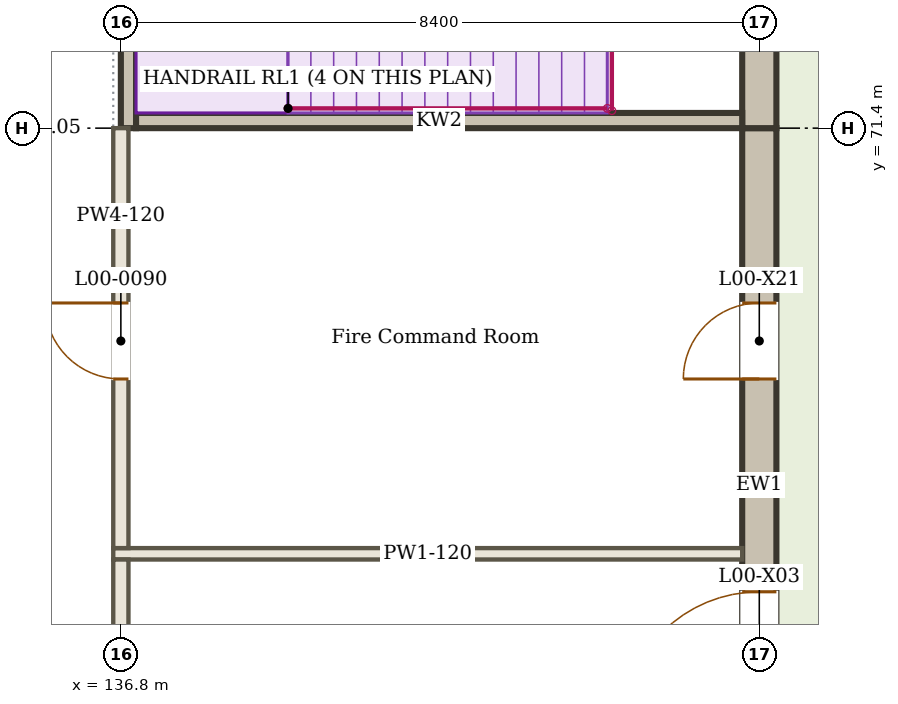
"""IFC4 building model, lengths in metres.
Left out: names, types, materials, properties, quantities, classifications, styles, units other than length and angle.
Written with IfcOpenShell. Run it as: python <this file> out.ifc"""

import sys

from ifc_helpers import new_model, si_unit, direction, frame, frame_2d, origin, place, context, subcontext, project, spatial, rectangle, extrude, element, fill, save


model = new_model("IFC4")
c1 = context("Model", 3, precision=1e-05, world=origin(), true_north=direction((0.0, 1.0)))
c2 = subcontext(c1, "Body", "Model", "MODEL_VIEW")
j1 = project(units=[si_unit("LENGTHUNIT", "METRE"), si_unit("PLANEANGLEUNIT", "RADIAN")], contexts=[c1])
p1 = place(None, origin())
s1 = spatial("IfcSite", under=j1, at=p1, CompositionType="ELEMENT")
p2 = place(p1, origin())
s2 = spatial("IfcBuilding", under=s1, at=p2, CompositionType="ELEMENT")
p3 = place(p2, origin())
s3 = spatial("IfcBuildingStorey", under=s2, at=p3, CompositionType="ELEMENT", Elevation=0.0)
p4 = place(p3, frame((145.2, 63.145, 0.0), z_axis=(0.0, 0.0, 1.0), x_axis=(0.0, 1.0, 0.0)))
e1 = element("IfcWall", 1, at=p4, inside=s3, PredefinedType="SOLIDWALL", context=c2, shape_type="SweptSolid", body=[
    extrude(rectangle(XDim=8.255, YDim=0.45, at=frame_2d((4.127, 0.0))), origin(), (0.0, 0.0, 1.0), 3.85),
])
p5 = place(p4, frame((0.355, 0.0, 0.0)))
e2 = element("IfcOpeningElement", 2, at=p5, cuts=e1, PredefinedType="OPENING", context=c2, shape_type="SweptSolid", body=[
    extrude(rectangle(XDim=1.8, YDim=2.1, at=frame_2d((0.9, 1.05))), frame((0.0, 0.235, 0.0), z_axis=(0.0, -1.0, 0.0), x_axis=(1.0, 0.0, 0.0)), (0.0, 0.0, 1.0), 0.47),
])
p6 = place(p4, frame((4.955, 0.0, 0.0)))
e3 = element("IfcOpeningElement", 3, at=p6, cuts=e1, PredefinedType="OPENING", context=c2, shape_type="SweptSolid", body=[
    extrude(rectangle(XDim=1.0, YDim=2.1, at=frame_2d((0.5, 1.05))), frame((0.0, 0.235, 0.0), z_axis=(0.0, -1.0, 0.0), x_axis=(1.0, 0.0, 0.0)), (0.0, 0.0, 1.0), 0.47),
])
p7 = place(p3, frame((145.36, 63.145, 4.202), z_axis=(0.0, 0.0, 1.0), x_axis=(0.0, 1.0, 0.0)))
e4 = element("IfcWall", 4, at=p7, inside=s3, PredefinedType="SOLIDWALL", context=c2, shape_type="SweptSolid", body=[
    extrude(rectangle(XDim=8.255, YDim=0.13, at=frame_2d((4.127, 0.0))), origin(), (0.0, 0.0, 1.0), 0.298),
])
p8 = place(p3, frame((136.7, 65.8, 0.0), z_axis=(0.0, 0.0, 1.0), x_axis=(1.0, 0.0, 0.0)))
e5 = element("IfcWall", 5, at=p8, inside=s3, PredefinedType="PARTITIONING", context=c2, shape_type="SweptSolid", body=[
    extrude(rectangle(XDim=8.275, YDim=0.15, at=frame_2d((4.138, 0.0))), origin(), (0.0, 0.0, 1.0), 3.8),
])
p9 = place(p3, frame((136.8, 63.15, 0.0), z_axis=(0.0, 0.0, 1.0), x_axis=(0.0, 1.0, 0.0)))
e6 = element("IfcWall", 6, at=p9, inside=s3, PredefinedType="PARTITIONING", context=c2, shape_type="SweptSolid", body=[
    extrude(rectangle(XDim=2.575, YDim=0.2, at=frame_2d((1.288, 0.0))), origin(), (0.0, 0.0, 1.0), 3.8),
])
p10 = place(p3, frame((136.8, 65.875, 0.0), z_axis=(0.0, 0.0, 1.0), x_axis=(0.0, 1.0, 0.0)))
e7 = element("IfcWall", 7, at=p10, inside=s3, PredefinedType="PARTITIONING", context=c2, shape_type="SweptSolid", body=[
    extrude(rectangle(XDim=5.525, YDim=0.2, at=frame_2d((2.762, 0.0))), origin(), (0.0, 0.0, 1.0), 3.8),
])
p11 = place(p10, frame((2.225, 0.0, 0.0)))
e8 = element("IfcOpeningElement", 8, at=p11, cuts=e7, PredefinedType="OPENING", context=c2, shape_type="SweptSolid", body=[
    extrude(rectangle(XDim=1.0, YDim=2.1, at=frame_2d((0.5, 1.05))), frame((0.0, 0.11, 0.0), z_axis=(0.0, -1.0, 0.0), x_axis=(1.0, 0.0, 0.0)), (0.0, 0.0, 1.0), 0.22),
])
p12 = place(p3, frame((136.9, 71.4, 0.0), z_axis=(0.0, 0.0, 1.0), x_axis=(0.0, 1.0, 0.0)))
e9 = element("IfcWall", 9, at=p12, inside=s3, PredefinedType="SOLIDWALL", context=c2, shape_type="SweptSolid", body=[
    extrude(rectangle(XDim=8.4, YDim=0.2, at=frame_2d((4.2, 0.0))), origin(), (0.0, 0.0, 1.0), 4.5),
])
p13 = place(p12, frame((4.725, 0.0, 0.0)))
e10 = element("IfcOpeningElement", 10, at=p13, cuts=e9, PredefinedType="OPENING", context=c2, shape_type="SweptSolid", body=[
    extrude(rectangle(XDim=1.3, YDim=2.1, at=frame_2d((0.65, 1.05))), frame((0.0, 0.11, 0.0), z_axis=(0.0, -1.0, 0.0), x_axis=(1.0, 0.0, 0.0)), (0.0, 0.0, 1.0), 0.22),
])
p14 = place(p3, frame((145.2, 71.4, 0.0), z_axis=(0.0, 0.0, 1.0), x_axis=(0.0, 1.0, 0.0)))
e11 = element("IfcWall", 11, at=p14, inside=s3, PredefinedType="SOLIDWALL", context=c2, shape_type="SweptSolid", body=[
    extrude(rectangle(XDim=8.4, YDim=0.45, at=frame_2d((4.2, 0.0))), origin(), (0.0, 0.0, 1.0), 4.5),
])
p15 = place(p14, frame((1.65, 0.0, 0.0)))
e12 = element("IfcOpeningElement", 12, at=p15, cuts=e11, PredefinedType="OPENING", context=c2, shape_type="SweptSolid", body=[
    extrude(rectangle(XDim=1.3, YDim=2.1, at=frame_2d((0.65, 1.05))), frame((0.0, 0.235, 0.0), z_axis=(0.0, -1.0, 0.0), x_axis=(1.0, 0.0, 0.0)), (0.0, 0.0, 1.0), 0.47),
])
p16 = place(p3, frame((137.0, 71.5, 0.0), z_axis=(0.0, 0.0, 1.0), x_axis=(1.0, 0.0, 0.0)))
e13 = element("IfcWall", 13, at=p16, inside=s3, PredefinedType="SOLIDWALL", context=c2, shape_type="SweptSolid", body=[
    extrude(rectangle(XDim=7.975, YDim=0.2, at=frame_2d((3.988, 0.0))), origin(), (0.0, 0.0, 1.0), 4.5),
])
p17 = place(p5, origin())
e14 = element("IfcDoor", 14, at=p17, inside=s3, OperationType="SINGLE_SWING_LEFT", PredefinedType="DOOR", context=c2, shape_type="SweptSolid", body=[
    extrude(rectangle(XDim=1.8, YDim=2.1, at=frame_2d((0.9, 1.05))), frame((0.0, 0.025, 0.0), z_axis=(0.0, -1.0, 0.0), x_axis=(1.0, 0.0, 0.0)), (0.0, 0.0, 1.0), 0.05),
])
fill(e2, e14)
p18 = place(p6, origin())
e15 = element("IfcDoor", 15, at=p18, inside=s3, OperationType="SINGLE_SWING_LEFT", PredefinedType="DOOR", context=c2, shape_type="SweptSolid", body=[
    extrude(rectangle(XDim=1.0, YDim=2.1, at=frame_2d((0.5, 1.05))), frame((0.0, 0.025, 0.0), z_axis=(0.0, -1.0, 0.0), x_axis=(1.0, 0.0, 0.0)), (0.0, 0.0, 1.0), 0.05),
])
fill(e3, e15)
p19 = place(p11, origin())
e16 = element("IfcDoor", 16, at=p19, inside=s3, OperationType="SINGLE_SWING_RIGHT", PredefinedType="DOOR", context=c2, shape_type="SweptSolid", body=[
    extrude(rectangle(XDim=1.0, YDim=2.1, at=frame_2d((0.5, 1.05))), frame((0.0, 0.025, 0.0), z_axis=(0.0, -1.0, 0.0), x_axis=(1.0, 0.0, 0.0)), (0.0, 0.0, 1.0), 0.05),
])
fill(e8, e16)
save(model, sys.argv[1])
